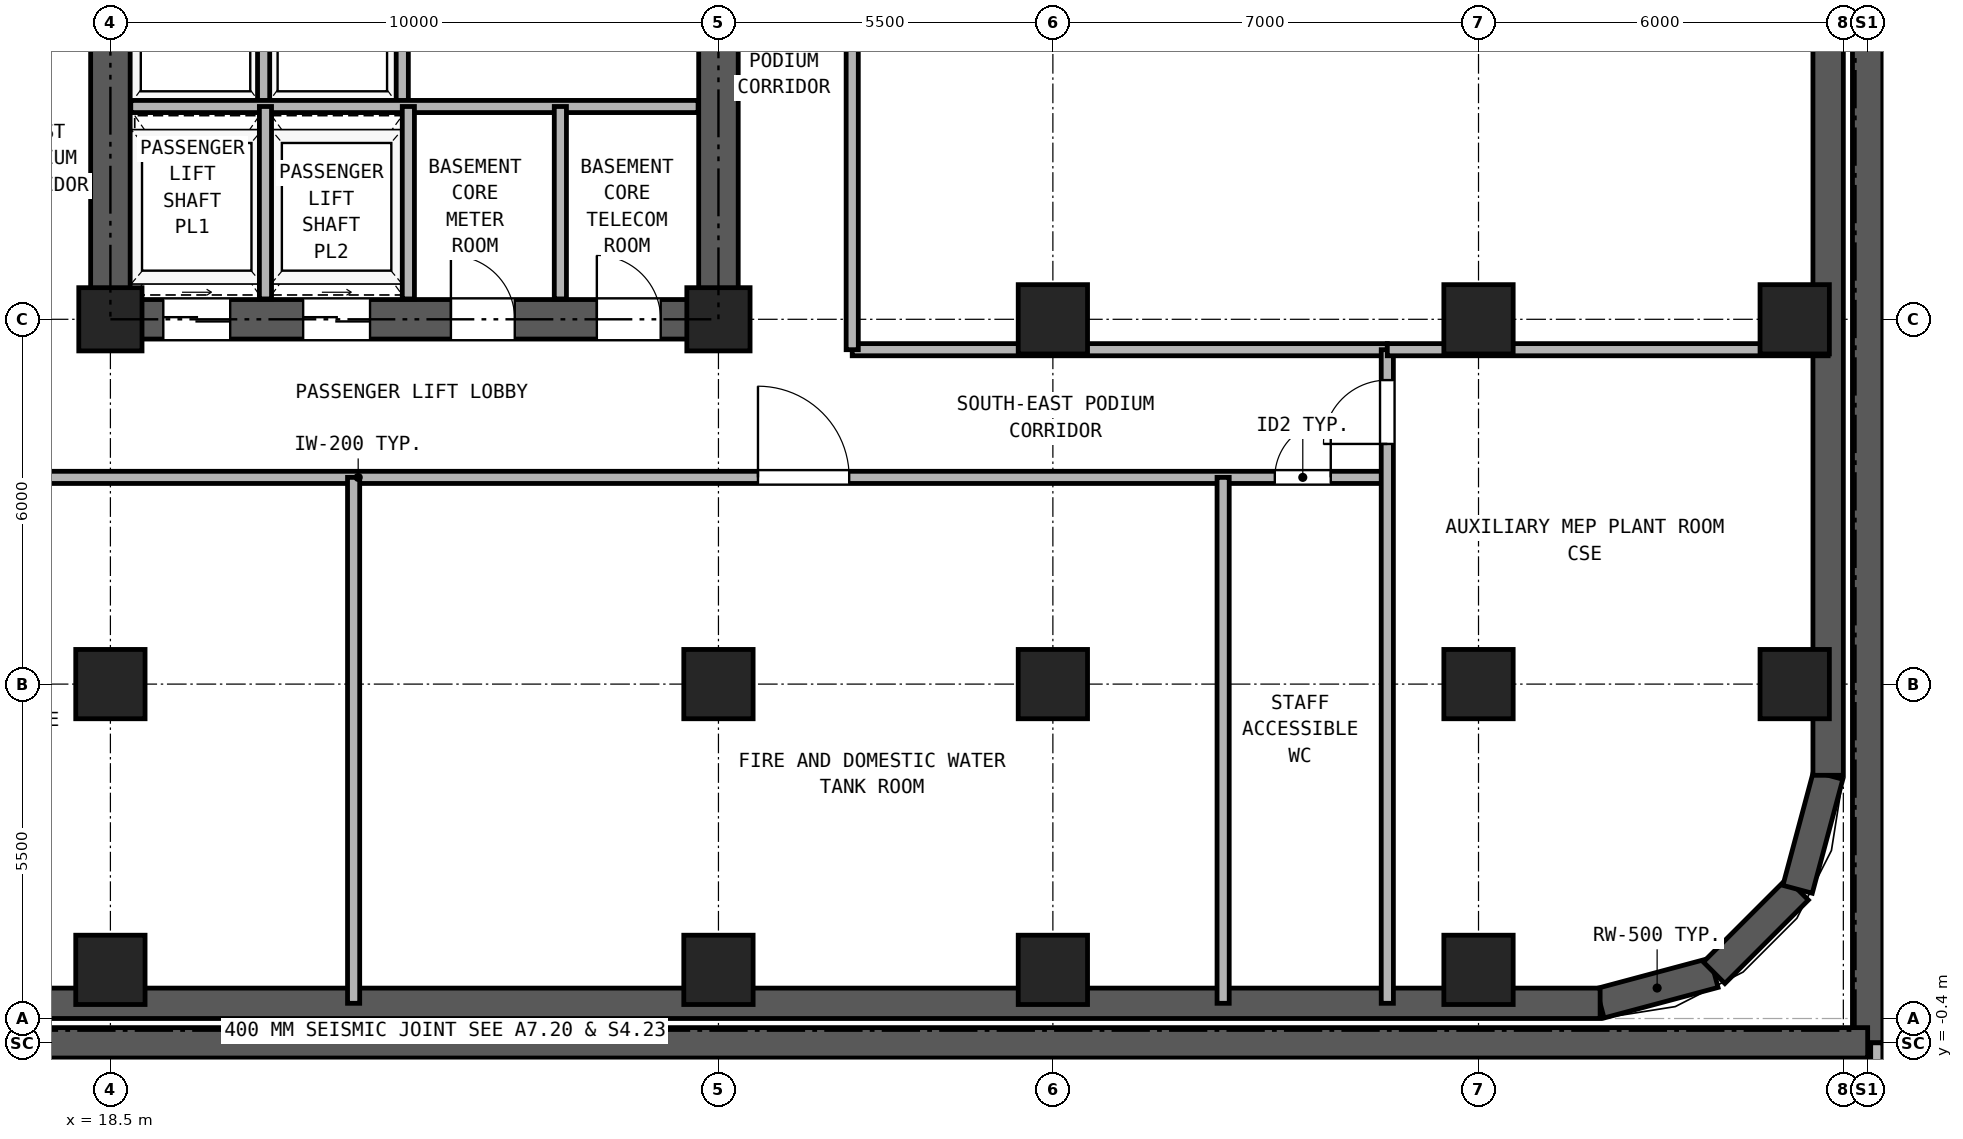
"""IFC4 building model, lengths in metres.
Left out: names, types, materials, properties, quantities, classifications, styles, units other than length and angle.
Written with IfcOpenShell. Run it as: python <this file> out.ifc"""

import sys

from ifc_helpers import new_model, si_unit, direction, frame, frame_2d, origin, origin_2d, place, context, subcontext, project, spatial, rectangle, hollow_rectangle, extrude, source, transform, mapped, element, fill, save


model = new_model("IFC4")
c1 = context("Model", 3, precision=1e-05, world=origin(), true_north=direction((0.0, 1.0)))
c2 = subcontext(c1, "Body", "Model", "MODEL_VIEW")
j1 = project(units=[si_unit("LENGTHUNIT", "METRE"), si_unit("PLANEANGLEUNIT", "RADIAN")], contexts=[c1])
p1 = place(None, origin())
s1 = spatial("IfcSite", under=j1, at=p1, CompositionType="ELEMENT")
p2 = place(p1, origin())
s2 = spatial("IfcBuilding", under=s1, at=p2, CompositionType="ELEMENT")
p3 = place(p2, frame((0.0, 0.0, -4.2)))
s3 = spatial("IfcBuildingStorey", under=s2, at=p3, CompositionType="ELEMENT", Elevation=-4.2)
m1 = source(origin(), c2, "Body", "SweptSolid", [
    extrude(hollow_rectangle(XDim=1.14, YDim=1.14, WallThickness=0.07, at=origin_2d()), origin(), (0.0, 0.0, 1.0), 3.88),
])
for number, where, z_axis, x_axis in (
    (1, (18.5, 0.8, 0.0), (0.0, 0.0, 1.0), (1.0, 0.0, 0.0)),
    (2, (28.5, 0.8, 0.0), (0.0, 0.0, 1.0), (1.0, 0.0, 0.0)),
    (3, (34.0, 0.8, 0.0), (0.0, 0.0, 1.0), (1.0, 0.0, 0.0)),
    (4, (41.0, 0.8, 0.0), (0.0, 0.0, 1.0), (1.0, 0.0, 0.0)),
    (5, (46.2, 5.5, 0.0), (0.0, 0.0, 1.0), (1.0, 0.0, 0.0)),
    (6, (46.2, 11.5, 0.0), (0.0, 0.0, 1.0), (1.0, 0.0, 0.0)),
    (7, (18.5, 5.5, 0.0), (0.0, 0.0, 1.0), (1.0, 0.0, 0.0)),
):
    element("IfcColumn", number, at=place(p3, frame(where, z_axis=z_axis, x_axis=x_axis)), inside=s3, PredefinedType="COLUMN", context=c2, shape_type="MappedRepresentation", body=[
        mapped(m1, transform((0.0, 0.0, 0.0), x_axis=(1.0, 0.0, 0.0), y_axis=(0.0, 1.0, 0.0), z_axis=(0.0, 0.0, 1.0), scale=1.0)),
    ])
m2 = source(origin(), c2, "Body", "SweptSolid", [
    extrude(hollow_rectangle(XDim=1.04, YDim=1.04, WallThickness=0.065, at=origin_2d()), origin(), (0.0, 0.0, 1.0), 3.88),
])
p4 = place(p3, frame((18.5, 11.5, 0.0), z_axis=(0.0, 0.0, 1.0), x_axis=(1.0, 0.0, 0.0)))
e8 = element("IfcColumn", 8, at=p4, inside=s3, PredefinedType="COLUMN", context=c2, shape_type="MappedRepresentation", body=[
    mapped(m2, transform((0.0, 0.0, 0.0), x_axis=(1.0, 0.0, 0.0), y_axis=(0.0, 1.0, 0.0), z_axis=(0.0, 0.0, 1.0), scale=1.0)),
])
p5 = place(p3, frame((28.5, 5.5, 0.0), z_axis=(0.0, 0.0, 1.0), x_axis=(1.0, 0.0, 0.0)))
e9 = element("IfcColumn", 9, at=p5, inside=s3, PredefinedType="COLUMN", context=c2, shape_type="MappedRepresentation", body=[
    mapped(m1, transform((0.0, 0.0, 0.0), x_axis=(1.0, 0.0, 0.0), y_axis=(0.0, 1.0, 0.0), z_axis=(0.0, 0.0, 1.0), scale=1.0)),
])
p6 = place(p3, frame((28.5, 11.5, 0.0), z_axis=(0.0, 0.0, 1.0), x_axis=(1.0, 0.0, 0.0)))
e10 = element("IfcColumn", 10, at=p6, inside=s3, PredefinedType="COLUMN", context=c2, shape_type="MappedRepresentation", body=[
    mapped(m2, transform((0.0, 0.0, 0.0), x_axis=(1.0, 0.0, 0.0), y_axis=(0.0, 1.0, 0.0), z_axis=(0.0, 0.0, 1.0), scale=1.0)),
])
for number, where, z_axis, x_axis in (
    (11, (34.0, 5.5, 0.0), (0.0, 0.0, 1.0), (1.0, 0.0, 0.0)),
    (12, (34.0, 11.5, 0.0), (0.0, 0.0, 1.0), (1.0, 0.0, 0.0)),
    (13, (41.0, 5.5, 0.0), (0.0, 0.0, 1.0), (1.0, 0.0, 0.0)),
    (14, (41.0, 11.5, 0.0), (0.0, 0.0, 1.0), (1.0, 0.0, 0.0)),
):
    element("IfcColumn", number, at=place(p3, frame(where, z_axis=z_axis, x_axis=x_axis)), inside=s3, PredefinedType="COLUMN", context=c2, shape_type="MappedRepresentation", body=[
        mapped(m1, transform((0.0, 0.0, 0.0), x_axis=(1.0, 0.0, 0.0), y_axis=(0.0, 1.0, 0.0), z_axis=(0.0, 0.0, 1.0), scale=1.0)),
    ])
for number, where, z_axis, x_axis in (
    (15, (43.0, 0.25, 0.0), (0.0, 0.0, 1.0), (0.966, 0.259, 0.0)),
    (16, (44.875, 0.752, 0.0), (0.0, 0.0, 1.0), (0.707, 0.707, 0.0)),
    (17, (46.248, 2.125, 0.0), (0.0, 0.0, 1.0), (0.259, 0.966, 0.0)),
):
    element("IfcWall", number, at=place(p3, frame(where, z_axis=z_axis, x_axis=x_axis)), inside=s3, PredefinedType="USERDEFINED", context=c2, shape_type="SweptSolid", body=[
        extrude(rectangle(XDim=1.941, YDim=0.5, at=frame_2d((0.971, 0.0))), origin(), (0.0, 0.0, 1.0), 3.88),
    ])
p7 = place(p3, frame((46.75, 4.0, 0.0), z_axis=(0.0, 0.0, 1.0), x_axis=(0.0, 1.0, 0.0)))
e18 = element("IfcWall", 18, at=p7, inside=s3, PredefinedType="USERDEFINED", context=c2, shape_type="SweptSolid", body=[
    extrude(rectangle(XDim=32.5, YDim=0.5, at=frame_2d((16.25, 0.0))), origin(), (0.0, 0.0, 1.0), 3.88),
])
p8 = place(p3, frame((4.0, 0.25, 0.0), z_axis=(0.0, 0.0, 1.0), x_axis=(1.0, 0.0, 0.0)))
e19 = element("IfcWall", 19, at=p8, inside=s3, PredefinedType="USERDEFINED", context=c2, shape_type="SweptSolid", body=[
    extrude(rectangle(XDim=39.0, YDim=0.5, at=frame_2d((19.5, 0.0))), origin(), (0.0, 0.0, 1.0), 3.88),
])
p9 = place(p3, frame((47.4, 40.5, 0.0), z_axis=(0.0, 0.0, 1.0), x_axis=(0.0, -1.0, 0.0)))
e20 = element("IfcWall", 20, at=p9, inside=s3, PredefinedType="USERDEFINED", context=c2, shape_type="SweptSolid", body=[
    extrude(rectangle(XDim=40.9, YDim=0.5, at=frame_2d((20.45, 0.0))), origin(), (0.0, 0.0, 1.0), 3.88),
])
p10 = place(p3, frame((47.4, -0.4, 0.0), z_axis=(0.0, 0.0, 1.0), x_axis=(-1.0, 0.0, 0.0)))
e21 = element("IfcWall", 21, at=p10, inside=s3, PredefinedType="USERDEFINED", context=c2, shape_type="SweptSolid", body=[
    extrude(rectangle(XDim=47.4, YDim=0.5, at=frame_2d((23.7, 0.0))), origin(), (0.0, 0.0, 1.0), 3.88),
])
p11 = place(p3, frame((18.175, 11.5, 0.0), z_axis=(0.0, 0.0, 1.0), x_axis=(1.0, 0.0, 0.0)))
e22 = element("IfcWall", 22, at=p11, inside=s3, PredefinedType="SHEAR", context=c2, shape_type="SweptSolid", body=[
    extrude(rectangle(XDim=10.65, YDim=0.65, at=frame_2d((5.325, 0.0))), origin(), (0.0, 0.0, 1.0), 3.88),
])
p12 = place(p11, frame((1.195, 0.0, 0.0)))
e23 = element("IfcOpeningElement", 23, at=p12, cuts=e22, PredefinedType="OPENING", context=c2, shape_type="SweptSolid", body=[
    extrude(rectangle(XDim=1.1, YDim=2.25, at=frame_2d((0.55, 1.125))), frame((0.0, 0.335, 0.0), z_axis=(0.0, -1.0, 0.0), x_axis=(1.0, 0.0, 0.0)), (0.0, 0.0, 1.0), 0.67),
])
p13 = place(p11, frame((3.495, 0.0, 0.0)))
e24 = element("IfcOpeningElement", 24, at=p13, cuts=e22, PredefinedType="OPENING", context=c2, shape_type="SweptSolid", body=[
    extrude(rectangle(XDim=1.1, YDim=2.25, at=frame_2d((0.55, 1.125))), frame((0.0, 0.335, 0.0), z_axis=(0.0, -1.0, 0.0), x_axis=(1.0, 0.0, 0.0)), (0.0, 0.0, 1.0), 0.67),
])
p14 = place(p11, frame((5.925, 0.0, 0.0)))
e25 = element("IfcOpeningElement", 25, at=p14, cuts=e22, PredefinedType="OPENING", context=c2, shape_type="SweptSolid", body=[
    extrude(rectangle(XDim=1.05, YDim=2.15, at=frame_2d((0.525, 1.075))), frame((0.0, 0.335, 0.0), z_axis=(0.0, -1.0, 0.0), x_axis=(1.0, 0.0, 0.0)), (0.0, 0.0, 1.0), 0.67),
])
p15 = place(p11, frame((8.325, 0.0, 0.0)))
e26 = element("IfcOpeningElement", 26, at=p15, cuts=e22, PredefinedType="OPENING", context=c2, shape_type="SweptSolid", body=[
    extrude(rectangle(XDim=1.05, YDim=2.15, at=frame_2d((0.525, 1.075))), frame((0.0, 0.335, 0.0), z_axis=(0.0, -1.0, 0.0), x_axis=(1.0, 0.0, 0.0)), (0.0, 0.0, 1.0), 0.67),
])
p16 = place(p3, frame((18.5, 11.825, 0.0), z_axis=(0.0, 0.0, 1.0), x_axis=(0.0, 1.0, 0.0)))
e27 = element("IfcWall", 27, at=p16, inside=s3, PredefinedType="SHEAR", context=c2, shape_type="SweptSolid", body=[
    extrude(rectangle(XDim=16.6, YDim=0.65, at=frame_2d((8.3, 0.0))), origin(), (0.0, 0.0, 1.0), 3.88),
])
p17 = place(p16, frame((7.325, 0.0, 0.0)))
e28 = element("IfcOpeningElement", 28, at=p17, cuts=e27, PredefinedType="OPENING", context=c2, shape_type="SweptSolid", body=[
    extrude(rectangle(XDim=1.15, YDim=2.2, at=frame_2d((0.575, 1.1))), frame((0.0, 0.335, 0.0), z_axis=(0.0, -1.0, 0.0), x_axis=(1.0, 0.0, 0.0)), (0.0, 0.0, 1.0), 0.67),
])
p18 = place(p3, frame((28.5, 11.825, 0.0), z_axis=(0.0, 0.0, 1.0), x_axis=(0.0, 1.0, 0.0)))
e29 = element("IfcWall", 29, at=p18, inside=s3, PredefinedType="SHEAR", context=c2, shape_type="SweptSolid", body=[
    extrude(rectangle(XDim=16.6, YDim=0.65, at=frame_2d((8.3, 0.0))), origin(), (0.0, 0.0, 1.0), 3.88),
])
p19 = place(p18, frame((7.325, 0.0, 0.0)))
e30 = element("IfcOpeningElement", 30, at=p19, cuts=e29, PredefinedType="OPENING", context=c2, shape_type="SweptSolid", body=[
    extrude(rectangle(XDim=1.15, YDim=2.2, at=frame_2d((0.575, 1.1))), frame((0.0, 0.335, 0.0), z_axis=(0.0, -1.0, 0.0), x_axis=(1.0, 0.0, 0.0)), (0.0, 0.0, 1.0), 0.67),
])
for number, where, z_axis, x_axis in (
    (31, (21.02, 15.0, 0.0), (0.0, 0.0, 1.0), (0.0, 1.0, 0.0)),
    (32, (23.3, 15.0, 0.0), (0.0, 0.0, 1.0), (0.0, 1.0, 0.0)),
):
    element("IfcWall", number, at=place(p3, frame(where, z_axis=z_axis, x_axis=x_axis)), inside=s3, PredefinedType="PARTITIONING", context=c2, shape_type="SweptSolid", body=[
        extrude(rectangle(XDim=3.0, YDim=0.2, at=frame_2d((1.5, 0.0))), origin(), (0.0, 0.0, 1.0), 3.88),
    ])
p20 = place(p3, frame((18.835, 15.0, 0.0), z_axis=(0.0, 0.0, 1.0), x_axis=(1.0, 0.0, 0.0)))
e33 = element("IfcWall", 33, at=p20, inside=s3, PredefinedType="PARTITIONING", context=c2, shape_type="SweptSolid", body=[
    extrude(rectangle(XDim=9.33, YDim=0.2, at=frame_2d((4.665, 0.0))), origin(), (0.0, 0.0, 1.0), 3.88),
])
for number, where, z_axis, x_axis in (
    (34, (21.05, 11.835, 0.0), (0.0, 0.0, 1.0), (0.0, 1.0, 0.0)),
    (35, (23.4, 11.835, 0.0), (0.0, 0.0, 1.0), (0.0, 1.0, 0.0)),
    (36, (25.9, 11.835, 0.0), (0.0, 0.0, 1.0), (0.0, 1.0, 0.0)),
):
    element("IfcWall", number, at=place(p3, frame(where, z_axis=z_axis, x_axis=x_axis)), inside=s3, PredefinedType="PARTITIONING", context=c2, shape_type="SweptSolid", body=[
        extrude(rectangle(XDim=3.165, YDim=0.2, at=frame_2d((1.583, 0.0))), origin(), (0.0, 0.0, 1.0), 3.88),
    ])
p21 = place(p3, frame((7.5, 8.9, 0.0), z_axis=(0.0, 0.0, 1.0), x_axis=(1.0, 0.0, 0.0)))
e37 = element("IfcWall", 37, at=p21, inside=s3, PredefinedType="PARTITIONING", context=c2, shape_type="SweptSolid", body=[
    extrude(rectangle(XDim=32.0, YDim=0.2, at=frame_2d((16.0, 0.0))), origin(), (0.0, 0.0, 1.0), 3.88),
])
p22 = place(p21, frame((7.0, 0.0, 0.0)))
e38 = element("IfcOpeningElement", 38, at=p22, cuts=e37, PredefinedType="OPENING", context=c2, shape_type="SweptSolid", body=[
    extrude(rectangle(XDim=1.5, YDim=2.25, at=frame_2d((0.75, 1.125))), frame((0.0, 0.11, 0.0), z_axis=(0.0, -1.0, 0.0), x_axis=(1.0, 0.0, 0.0)), (0.0, 0.0, 1.0), 0.22),
])
p23 = place(p21, frame((21.65, 0.0, 0.0)))
e39 = element("IfcOpeningElement", 39, at=p23, cuts=e37, PredefinedType="OPENING", context=c2, shape_type="SweptSolid", body=[
    extrude(rectangle(XDim=1.5, YDim=2.25, at=frame_2d((0.75, 1.125))), frame((0.0, 0.11, 0.0), z_axis=(0.0, -1.0, 0.0), x_axis=(1.0, 0.0, 0.0)), (0.0, 0.0, 1.0), 0.22),
])
p24 = place(p21, frame((30.15, 0.0, 0.0)))
e40 = element("IfcOpeningElement", 40, at=p24, cuts=e37, PredefinedType="OPENING", context=c2, shape_type="SweptSolid", body=[
    extrude(rectangle(XDim=0.92, YDim=2.1, at=frame_2d((0.46, 1.05))), frame((0.0, 0.11, 0.0), z_axis=(0.0, -1.0, 0.0), x_axis=(1.0, 0.0, 0.0)), (0.0, 0.0, 1.0), 0.22),
])
p25 = place(p3, frame((30.7, 11.0, 0.0), z_axis=(0.0, 0.0, 1.0), x_axis=(1.0, 0.0, 0.0)))
e41 = element("IfcWall", 41, at=p25, inside=s3, PredefinedType="PARTITIONING", context=c2, shape_type="SweptSolid", body=[
    extrude(rectangle(XDim=8.8, YDim=0.2, at=frame_2d((4.4, 0.0))), origin(), (0.0, 0.0, 1.0), 3.88),
])
p26 = place(p3, frame((30.7, 11.0, 0.0), z_axis=(0.0, 0.0, 1.0), x_axis=(0.0, 1.0, 0.0)))
e42 = element("IfcWall", 42, at=p26, inside=s3, PredefinedType="PARTITIONING", context=c2, shape_type="SweptSolid", body=[
    extrude(rectangle(XDim=18.25, YDim=0.2, at=frame_2d((9.125, 0.0))), origin(), (0.0, 0.0, 1.0), 3.88),
])
p27 = place(p26, frame((8.625, 0.0, 0.0)))
e43 = element("IfcOpeningElement", 43, at=p27, cuts=e42, PredefinedType="OPENING", context=c2, shape_type="SweptSolid", body=[
    extrude(rectangle(XDim=0.95, YDim=2.15, at=frame_2d((0.475, 1.075))), frame((0.0, 0.11, 0.0), z_axis=(0.0, -1.0, 0.0), x_axis=(1.0, 0.0, 0.0)), (0.0, 0.0, 1.0), 0.22),
])
p28 = place(p3, frame((39.5, 0.25, 0.0), z_axis=(0.0, 0.0, 1.0), x_axis=(0.0, 1.0, 0.0)))
e44 = element("IfcWall", 44, at=p28, inside=s3, PredefinedType="PARTITIONING", context=c2, shape_type="SweptSolid", body=[
    extrude(rectangle(XDim=10.75, YDim=0.2, at=frame_2d((5.375, 0.0))), origin(), (0.0, 0.0, 1.0), 3.88),
])
p29 = place(p28, frame((9.2, 0.0, 0.0)))
e45 = element("IfcOpeningElement", 45, at=p29, cuts=e44, PredefinedType="OPENING", context=c2, shape_type="SweptSolid", body=[
    extrude(rectangle(XDim=1.05, YDim=2.15, at=frame_2d((0.525, 1.075))), frame((0.0, 0.11, 0.0), z_axis=(0.0, -1.0, 0.0), x_axis=(1.0, 0.0, 0.0)), (0.0, 0.0, 1.0), 0.22),
])
p30 = place(p3, frame((39.5, 11.0, 0.0), z_axis=(0.0, 0.0, 1.0), x_axis=(1.0, 0.0, 0.0)))
e46 = element("IfcWall", 46, at=p30, inside=s3, PredefinedType="PARTITIONING", context=c2, shape_type="SweptSolid", body=[
    extrude(rectangle(XDim=7.25, YDim=0.2, at=frame_2d((3.625, 0.0))), origin(), (0.0, 0.0, 1.0), 3.88),
])
for number, where, z_axis, x_axis in (
    (47, (22.5, 0.25, 0.0), (0.0, 0.0, 1.0), (0.0, 1.0, 0.0)),
    (48, (36.8, 0.25, 0.0), (0.0, 0.0, 1.0), (0.0, 1.0, 0.0)),
):
    element("IfcWall", number, at=place(p3, frame(where, z_axis=z_axis, x_axis=x_axis)), inside=s3, PredefinedType="PARTITIONING", context=c2, shape_type="SweptSolid", body=[
        extrude(rectangle(XDim=8.65, YDim=0.2, at=frame_2d((4.325, 0.0))), origin(), (0.0, 0.0, 1.0), 3.88),
    ])
p31 = place(p3, frame((47.55, -10.95, 0.0), z_axis=(0.0, 0.0, 1.0), x_axis=(0.0, 1.0, 0.0)))
e49 = element("IfcWall", 49, at=p31, inside=s3, PredefinedType="PARTITIONING", context=c2, shape_type="SweptSolid", body=[
    extrude(rectangle(XDim=10.55, YDim=0.2, at=frame_2d((5.275, 0.0))), origin(), (0.0, 0.0, 1.0), 3.88),
])
p32 = place(p31, frame((5.35, 0.0, 0.0)))
e50 = element("IfcOpeningElement", 50, at=p32, cuts=e49, PredefinedType="OPENING", context=c2, shape_type="SweptSolid", body=[
    extrude(rectangle(XDim=1.3, YDim=2.2, at=frame_2d((0.65, 1.1))), frame((0.0, 0.11, 0.0), z_axis=(0.0, -1.0, 0.0), x_axis=(1.0, 0.0, 0.0)), (0.0, 0.0, 1.0), 0.22),
])
p33 = place(p12, frame((1.1, 0.0, 0.0), z_axis=(0.0, 0.0, 1.0), x_axis=(-1.0, 0.0, 0.0)))
e51 = element("IfcDoor", 51, at=p33, inside=s3, OperationType="DOUBLE_DOOR_SLIDING", PredefinedType="DOOR", context=c2, shape_type="SweptSolid", body=[
    extrude(rectangle(XDim=1.1, YDim=2.25, at=frame_2d((0.55, 1.125))), frame((0.0, 0.025, 0.0), z_axis=(0.0, -1.0, 0.0), x_axis=(1.0, 0.0, 0.0)), (0.0, 0.0, 1.0), 0.05),
])
fill(e23, e51)
p34 = place(p13, frame((1.1, 0.0, 0.0), z_axis=(0.0, 0.0, 1.0), x_axis=(-1.0, 0.0, 0.0)))
e52 = element("IfcDoor", 52, at=p34, inside=s3, OperationType="DOUBLE_DOOR_SLIDING", PredefinedType="DOOR", context=c2, shape_type="SweptSolid", body=[
    extrude(rectangle(XDim=1.1, YDim=2.25, at=frame_2d((0.55, 1.125))), frame((0.0, 0.025, 0.0), z_axis=(0.0, -1.0, 0.0), x_axis=(1.0, 0.0, 0.0)), (0.0, 0.0, 1.0), 0.05),
])
fill(e24, e52)
p35 = place(p14, frame((1.05, 0.0, 0.0), z_axis=(0.0, 0.0, 1.0), x_axis=(-1.0, 0.0, 0.0)))
e53 = element("IfcDoor", 53, at=p35, inside=s3, OperationType="SINGLE_SWING_LEFT", PredefinedType="DOOR", context=c2, shape_type="SweptSolid", body=[
    extrude(rectangle(XDim=1.05, YDim=2.15, at=frame_2d((0.525, 1.075))), frame((0.0, 0.025, 0.0), z_axis=(0.0, -1.0, 0.0), x_axis=(1.0, 0.0, 0.0)), (0.0, 0.0, 1.0), 0.05),
])
fill(e25, e53)
p36 = place(p15, frame((1.05, 0.0, 0.0), z_axis=(0.0, 0.0, 1.0), x_axis=(-1.0, 0.0, 0.0)))
e54 = element("IfcDoor", 54, at=p36, inside=s3, OperationType="SINGLE_SWING_LEFT", PredefinedType="DOOR", context=c2, shape_type="SweptSolid", body=[
    extrude(rectangle(XDim=1.05, YDim=2.15, at=frame_2d((0.525, 1.075))), frame((0.0, 0.025, 0.0), z_axis=(0.0, -1.0, 0.0), x_axis=(1.0, 0.0, 0.0)), (0.0, 0.0, 1.0), 0.05),
])
fill(e26, e54)
p37 = place(p23, frame((1.5, 0.0, 0.0), z_axis=(0.0, 0.0, 1.0), x_axis=(-1.0, 0.0, 0.0)))
e55 = element("IfcDoor", 55, at=p37, inside=s3, OperationType="SINGLE_SWING_LEFT", PredefinedType="DOOR", context=c2, shape_type="SweptSolid", body=[
    extrude(rectangle(XDim=1.5, YDim=2.25, at=frame_2d((0.75, 1.125))), frame((0.0, 0.025, 0.0), z_axis=(0.0, -1.0, 0.0), x_axis=(1.0, 0.0, 0.0)), (0.0, 0.0, 1.0), 0.05),
])
fill(e39, e55)
p38 = place(p24, frame((0.92, 0.0, 0.0), z_axis=(0.0, 0.0, 1.0), x_axis=(-1.0, 0.0, 0.0)))
e56 = element("IfcDoor", 56, at=p38, inside=s3, OperationType="SINGLE_SWING_RIGHT", PredefinedType="DOOR", context=c2, shape_type="SweptSolid", body=[
    extrude(rectangle(XDim=0.92, YDim=2.1, at=frame_2d((0.46, 1.05))), frame((0.0, 0.025, 0.0), z_axis=(0.0, -1.0, 0.0), x_axis=(1.0, 0.0, 0.0)), (0.0, 0.0, 1.0), 0.05),
])
fill(e40, e56)
p39 = place(p29, origin())
e57 = element("IfcDoor", 57, at=p39, inside=s3, OperationType="SINGLE_SWING_LEFT", PredefinedType="DOOR", context=c2, shape_type="SweptSolid", body=[
    extrude(rectangle(XDim=1.05, YDim=2.15, at=frame_2d((0.525, 1.075))), frame((0.0, 0.025, 0.0), z_axis=(0.0, -1.0, 0.0), x_axis=(1.0, 0.0, 0.0)), (0.0, 0.0, 1.0), 0.05),
])
fill(e45, e57)
save(model, sys.argv[1])
